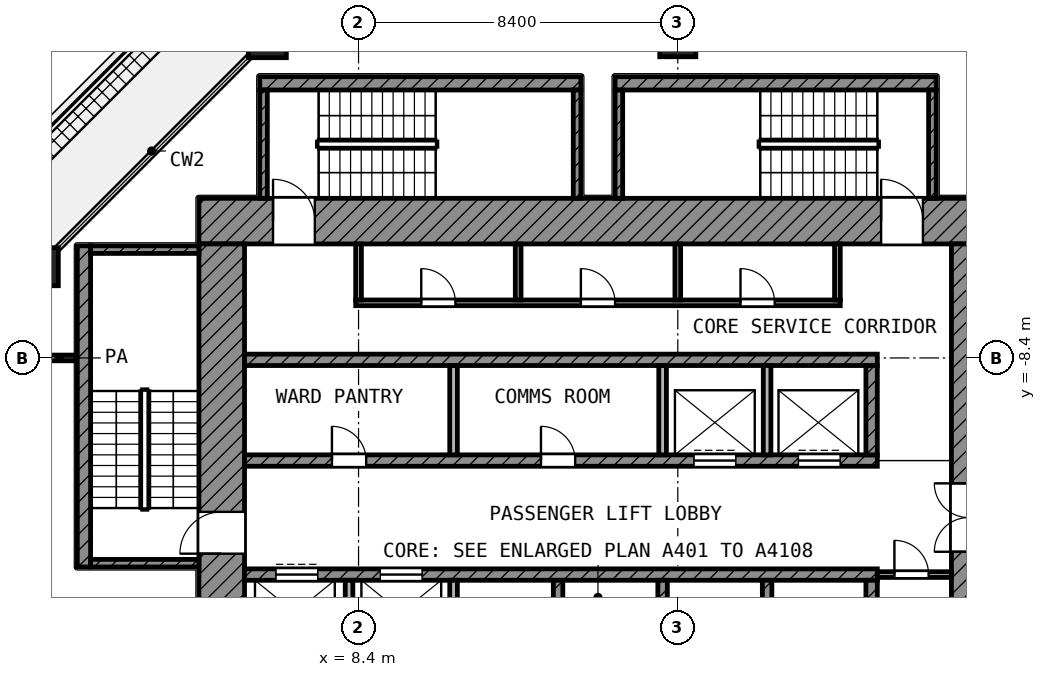
"""IFC4 building model, lengths in metres.
Left out: names, types, materials, properties, quantities, classifications, styles, units other than length and angle.
Written with IfcOpenShell. Run it as: python <this file> out.ifc"""

import sys

from ifc_helpers import new_model, si_unit, direction, frame, frame_2d, origin, origin_2d, place, context, subcontext, project, spatial, rectangle, extrude, element, fill, save


model = new_model("IFC4")
c1 = context("Model", 3, precision=1e-05, world=origin(), true_north=direction((0.0, 1.0)))
c2 = subcontext(c1, "Body", "Model", "MODEL_VIEW")
j1 = project(units=[si_unit("LENGTHUNIT", "METRE"), si_unit("PLANEANGLEUNIT", "RADIAN")], contexts=[c1])
p1 = place(None, origin())
s1 = spatial("IfcSite", under=j1, at=p1, CompositionType="ELEMENT")
p2 = place(p1, origin())
s2 = spatial("IfcBuilding", under=s1, at=p2, CompositionType="ELEMENT")
p3 = place(p2, frame((0.0, 0.0, 166.8)))
s3 = spatial("IfcBuildingStorey", under=s2, at=p3, CompositionType="ELEMENT", Elevation=166.8)
p4 = place(p3, frame((6.0, 0.0, 0.0), z_axis=(0.0, 0.0, 1.0), x_axis=(1.0, 0.0, 0.0)))
e1 = element("IfcColumn", 1, at=p4, inside=s3, PredefinedType="COLUMN", context=c2, shape_type="SweptSolid", body=[
    extrude(rectangle(XDim=1.0, YDim=1.0, at=origin_2d()), origin(), (0.0, 0.0, 1.0), 4.2),
])
p5 = place(p3, frame((16.8, 0.0, 0.0), z_axis=(0.0, 0.0, 1.0), x_axis=(1.0, 0.0, 0.0)))
e2 = element("IfcColumn", 2, at=p5, inside=s3, PredefinedType="COLUMN", context=c2, shape_type="SweptSolid", body=[
    extrude(rectangle(XDim=0.95, YDim=0.95, at=origin_2d()), origin(), (0.0, 0.0, 1.0), 4.2),
])
p6 = place(p3, frame((0.0, -6.0, 0.0), z_axis=(0.0, 0.0, 1.0), x_axis=(1.0, 0.0, 0.0)))
e3 = element("IfcColumn", 3, at=p6, inside=s3, PredefinedType="COLUMN", context=c2, shape_type="SweptSolid", body=[
    extrude(rectangle(XDim=1.0, YDim=1.0, at=origin_2d()), origin(), (0.0, 0.0, 1.0), 4.2),
])
p7 = place(p3, frame((4.2, -4.8, 0.0), z_axis=(0.0, 0.0, 1.0), x_axis=(1.0, 0.0, 0.0)))
e4 = element("IfcWall", 4, at=p7, inside=s3, PredefinedType="SHEAR", context=c2, shape_type="SweptSolid", body=[
    extrude(rectangle(XDim=20.7, YDim=1.2, at=frame_2d((10.35, 0.0))), origin(), (0.0, 0.0, 1.0), 3.6),
])
p8 = place(p7, frame((1.95, 0.0, 0.0)))
e5 = element("IfcOpeningElement", 5, at=p8, cuts=e4, PredefinedType="OPENING", context=c2, shape_type="SweptSolid", body=[
    extrude(rectangle(XDim=1.1, YDim=2.1, at=frame_2d((0.55, 1.05))), frame((0.0, 0.61, 0.0), z_axis=(0.0, -1.0, 0.0), x_axis=(1.0, 0.0, 0.0)), (0.0, 0.0, 1.0), 1.22),
])
p9 = place(p7, frame((17.95, 0.0, 0.0)))
e6 = element("IfcOpeningElement", 6, at=p9, cuts=e4, PredefinedType="OPENING", context=c2, shape_type="SweptSolid", body=[
    extrude(rectangle(XDim=1.1, YDim=2.1, at=frame_2d((0.55, 1.05))), frame((0.0, 0.61, 0.0), z_axis=(0.0, -1.0, 0.0), x_axis=(1.0, 0.0, 0.0)), (0.0, 0.0, 1.0), 1.22),
])
p10 = place(p3, frame((4.8, -24.9, 0.0), z_axis=(0.0, 0.0, 1.0), x_axis=(0.0, 1.0, 0.0)))
e7 = element("IfcWall", 7, at=p10, inside=s3, PredefinedType="SHEAR", context=c2, shape_type="SweptSolid", body=[
    extrude(rectangle(XDim=19.5, YDim=1.2, at=frame_2d((9.75, 0.0))), origin(), (0.0, 0.0, 1.0), 3.6),
])
p11 = place(p10, frame((11.35, 0.0, 0.0)))
e8 = element("IfcOpeningElement", 8, at=p11, cuts=e7, PredefinedType="OPENING", context=c2, shape_type="SweptSolid", body=[
    extrude(rectangle(XDim=1.1, YDim=2.1, at=frame_2d((0.55, 1.05))), frame((0.0, 0.61, 0.0), z_axis=(0.0, -1.0, 0.0), x_axis=(1.0, 0.0, 0.0)), (0.0, 0.0, 1.0), 1.22),
])
p12 = place(p10, frame((2.05, 0.0, 0.0)))
e9 = element("IfcOpeningElement", 9, at=p12, cuts=e7, PredefinedType="OPENING", context=c2, shape_type="SweptSolid", body=[
    extrude(rectangle(XDim=1.1, YDim=2.1, at=frame_2d((0.55, 1.05))), frame((0.0, 0.61, 0.0), z_axis=(0.0, -1.0, 0.0), x_axis=(1.0, 0.0, 0.0)), (0.0, 0.0, 1.0), 1.22),
])
p13 = place(p3, frame((24.45, -24.0, 0.0), z_axis=(0.0, 0.0, 1.0), x_axis=(0.0, 1.0, 0.0)))
e10 = element("IfcWall", 10, at=p13, inside=s3, PredefinedType="SHEAR", context=c2, shape_type="SweptSolid", body=[
    extrude(rectangle(XDim=18.6, YDim=0.9, at=frame_2d((9.3, 0.0))), origin(), (0.0, 0.0, 1.0), 3.6),
])
p14 = place(p13, frame((10.5, 0.0, 0.0)))
e11 = element("IfcOpeningElement", 11, at=p14, cuts=e10, PredefinedType="OPENING", context=c2, shape_type="SweptSolid", body=[
    extrude(rectangle(XDim=1.8, YDim=2.1, at=frame_2d((0.9, 1.05))), frame((0.0, 0.46, 0.0), z_axis=(0.0, -1.0, 0.0), x_axis=(1.0, 0.0, 0.0)), (0.0, 0.0, 1.0), 0.92),
])
p15 = place(p3, frame((5.4, -8.45, 0.0), z_axis=(0.0, 0.0, 1.0), x_axis=(1.0, 0.0, 0.0)))
e12 = element("IfcWall", 12, at=p15, inside=s3, PredefinedType="SHEAR", context=c2, shape_type="SweptSolid", body=[
    extrude(rectangle(XDim=16.65, YDim=0.3, at=frame_2d((8.325, 0.0))), origin(), (0.0, 0.0, 1.0), 3.6),
])
p16 = place(p3, frame((5.4, -11.1, 0.0), z_axis=(0.0, 0.0, 1.0), x_axis=(1.0, 0.0, 0.0)))
e13 = element("IfcWall", 13, at=p16, inside=s3, PredefinedType="SHEAR", context=c2, shape_type="SweptSolid", body=[
    extrude(rectangle(XDim=16.65, YDim=0.3, at=frame_2d((8.325, 0.0))), origin(), (0.0, 0.0, 1.0), 3.6),
])
p17 = place(p16, frame((11.825, 0.0, 0.0)))
e14 = element("IfcOpeningElement", 14, at=p17, cuts=e13, PredefinedType="OPENING", context=c2, shape_type="SweptSolid", body=[
    extrude(rectangle(XDim=1.1, YDim=2.1, at=frame_2d((0.55, 1.05))), frame((0.0, 0.16, 0.0), z_axis=(0.0, -1.0, 0.0), x_axis=(1.0, 0.0, 0.0)), (0.0, 0.0, 1.0), 0.32),
])
p18 = place(p16, frame((14.575, 0.0, 0.0)))
e15 = element("IfcOpeningElement", 15, at=p18, cuts=e13, PredefinedType="OPENING", context=c2, shape_type="SweptSolid", body=[
    extrude(rectangle(XDim=1.1, YDim=2.1, at=frame_2d((0.55, 1.05))), frame((0.0, 0.16, 0.0), z_axis=(0.0, -1.0, 0.0), x_axis=(1.0, 0.0, 0.0)), (0.0, 0.0, 1.0), 0.32),
])
p19 = place(p16, frame((2.3, 0.0, 0.0)))
e16 = element("IfcOpeningElement", 16, at=p19, cuts=e13, PredefinedType="OPENING", context=c2, shape_type="SweptSolid", body=[
    extrude(rectangle(XDim=0.9, YDim=2.1, at=frame_2d((0.45, 1.05))), frame((0.0, 0.16, 0.0), z_axis=(0.0, -1.0, 0.0), x_axis=(1.0, 0.0, 0.0)), (0.0, 0.0, 1.0), 0.32),
])
p20 = place(p16, frame((7.8, 0.0, 0.0)))
e17 = element("IfcOpeningElement", 17, at=p20, cuts=e13, PredefinedType="OPENING", context=c2, shape_type="SweptSolid", body=[
    extrude(rectangle(XDim=0.9, YDim=2.1, at=frame_2d((0.45, 1.05))), frame((0.0, 0.16, 0.0), z_axis=(0.0, -1.0, 0.0), x_axis=(1.0, 0.0, 0.0)), (0.0, 0.0, 1.0), 0.32),
])
p21 = place(p3, frame((5.4, -14.1, 0.0), z_axis=(0.0, 0.0, 1.0), x_axis=(1.0, 0.0, 0.0)))
e18 = element("IfcWall", 18, at=p21, inside=s3, PredefinedType="SHEAR", context=c2, shape_type="SweptSolid", body=[
    extrude(rectangle(XDim=16.65, YDim=0.3, at=frame_2d((8.325, 0.0))), origin(), (0.0, 0.0, 1.0), 3.6),
])
p22 = place(p21, frame((0.825, 0.0, 0.0)))
e19 = element("IfcOpeningElement", 19, at=p22, cuts=e18, PredefinedType="OPENING", context=c2, shape_type="SweptSolid", body=[
    extrude(rectangle(XDim=1.1, YDim=2.1, at=frame_2d((0.55, 1.05))), frame((0.0, 0.16, 0.0), z_axis=(0.0, -1.0, 0.0), x_axis=(1.0, 0.0, 0.0)), (0.0, 0.0, 1.0), 0.32),
])
p23 = place(p21, frame((3.575, 0.0, 0.0)))
e20 = element("IfcOpeningElement", 20, at=p23, cuts=e18, PredefinedType="OPENING", context=c2, shape_type="SweptSolid", body=[
    extrude(rectangle(XDim=1.1, YDim=2.1, at=frame_2d((0.55, 1.05))), frame((0.0, 0.16, 0.0), z_axis=(0.0, -1.0, 0.0), x_axis=(1.0, 0.0, 0.0)), (0.0, 0.0, 1.0), 0.32),
])
p24 = place(p3, frame((21.9, -10.95, 0.0), z_axis=(0.0, 0.0, 1.0), x_axis=(0.0, 1.0, 0.0)))
e21 = element("IfcWall", 21, at=p24, inside=s3, PredefinedType="SHEAR", context=c2, shape_type="SweptSolid", body=[
    extrude(rectangle(XDim=2.35, YDim=0.3, at=frame_2d((1.175, 0.0))), origin(), (0.0, 0.0, 1.0), 3.6),
])
p25 = place(p3, frame((21.9, -16.6, 0.0), z_axis=(0.0, 0.0, 1.0), x_axis=(0.0, 1.0, 0.0)))
e22 = element("IfcWall", 22, at=p25, inside=s3, PredefinedType="SHEAR", context=c2, shape_type="SweptSolid", body=[
    extrude(rectangle(XDim=2.35, YDim=0.3, at=frame_2d((1.175, 0.0))), origin(), (0.0, 0.0, 1.0), 3.6),
])
for number, where, z_axis, x_axis in (
    (23, (10.9, -10.95, 0.0), (0.0, 0.0, 1.0), (0.0, 1.0, 0.0)),
    (24, (16.4, -10.95, 0.0), (0.0, 0.0, 1.0), (0.0, 1.0, 0.0)),
    (25, (19.15, -10.95, 0.0), (0.0, 0.0, 1.0), (0.0, 1.0, 0.0)),
):
    element("IfcWall", number, at=place(p3, frame(where, z_axis=z_axis, x_axis=x_axis)), inside=s3, PredefinedType="PARTITIONING", context=c2, shape_type="SweptSolid", body=[
        extrude(rectangle(XDim=2.35, YDim=0.2, at=frame_2d((1.175, 0.0))), origin(), (0.0, 0.0, 1.0), 3.6),
    ])
for number, where, z_axis, x_axis in (
    (26, (8.15, -16.6, 0.0), (0.0, 0.0, 1.0), (0.0, 1.0, 0.0)),
    (27, (10.9, -16.6, 0.0), (0.0, 0.0, 1.0), (0.0, 1.0, 0.0)),
):
    element("IfcWall", number, at=place(p3, frame(where, z_axis=z_axis, x_axis=x_axis)), inside=s3, PredefinedType="PARTITIONING", context=c2, shape_type="SweptSolid", body=[
        extrude(rectangle(XDim=2.35, YDim=0.2, at=frame_2d((1.175, 0.0))), origin(), (0.0, 0.0, 1.0), 3.6),
    ])
for number, where, z_axis, x_axis in (
    (28, (13.65, -16.6, 0.0), (0.0, 0.0, 1.0), (0.0, 1.0, 0.0)),
    (29, (16.4, -16.6, 0.0), (0.0, 0.0, 1.0), (0.0, 1.0, 0.0)),
    (30, (19.15, -16.6, 0.0), (0.0, 0.0, 1.0), (0.0, 1.0, 0.0)),
):
    element("IfcWall", number, at=place(p3, frame(where, z_axis=z_axis, x_axis=x_axis)), inside=s3, PredefinedType="SHEAR", context=c2, shape_type="SweptSolid", body=[
        extrude(rectangle(XDim=2.35, YDim=0.25, at=frame_2d((1.175, 0.0))), origin(), (0.0, 0.0, 1.0), 3.6),
    ])
p26 = place(p3, frame((22.05, -14.1, 0.0), z_axis=(0.0, 0.0, 1.0), x_axis=(1.0, 0.0, 0.0)))
e31 = element("IfcWall", 31, at=p26, inside=s3, PredefinedType="PARTITIONING", context=c2, shape_type="SweptSolid", body=[
    extrude(rectangle(XDim=1.95, YDim=0.15, at=frame_2d((0.975, 0.0))), origin(), (0.0, 0.0, 1.0), 3.6),
])
p27 = place(p26, frame((0.45, 0.0, 0.0)))
e32 = element("IfcOpeningElement", 32, at=p27, cuts=e31, PredefinedType="OPENING", context=c2, shape_type="SweptSolid", body=[
    extrude(rectangle(XDim=0.9, YDim=2.1, at=frame_2d((0.45, 1.05))), frame((0.0, 0.085, 0.0), z_axis=(0.0, -1.0, 0.0), x_axis=(1.0, 0.0, 0.0)), (0.0, 0.0, 1.0), 0.17),
])
p28 = place(p3, frame((8.325, -6.95, 0.0), z_axis=(0.0, 0.0, 1.0), x_axis=(1.0, 0.0, 0.0)))
e33 = element("IfcWall", 33, at=p28, inside=s3, PredefinedType="PARTITIONING", context=c2, shape_type="SweptSolid", body=[
    extrude(rectangle(XDim=12.75, YDim=0.15, at=frame_2d((6.375, 0.0))), origin(), (0.0, 0.0, 1.0), 3.6),
])
p29 = place(p28, frame((1.725, 0.0, 0.0)))
e34 = element("IfcOpeningElement", 34, at=p29, cuts=e33, PredefinedType="OPENING", context=c2, shape_type="SweptSolid", body=[
    extrude(rectangle(XDim=0.9, YDim=2.1, at=frame_2d((0.45, 1.05))), frame((0.0, 0.085, 0.0), z_axis=(0.0, -1.0, 0.0), x_axis=(1.0, 0.0, 0.0)), (0.0, 0.0, 1.0), 0.17),
])
p30 = place(p28, frame((5.925, 0.0, 0.0)))
e35 = element("IfcOpeningElement", 35, at=p30, cuts=e33, PredefinedType="OPENING", context=c2, shape_type="SweptSolid", body=[
    extrude(rectangle(XDim=0.9, YDim=2.1, at=frame_2d((0.45, 1.05))), frame((0.0, 0.085, 0.0), z_axis=(0.0, -1.0, 0.0), x_axis=(1.0, 0.0, 0.0)), (0.0, 0.0, 1.0), 0.17),
])
p31 = place(p28, frame((10.125, 0.0, 0.0)))
e36 = element("IfcOpeningElement", 36, at=p31, cuts=e33, PredefinedType="OPENING", context=c2, shape_type="SweptSolid", body=[
    extrude(rectangle(XDim=0.9, YDim=2.1, at=frame_2d((0.45, 1.05))), frame((0.0, 0.085, 0.0), z_axis=(0.0, -1.0, 0.0), x_axis=(1.0, 0.0, 0.0)), (0.0, 0.0, 1.0), 0.17),
])
for number, where, z_axis, x_axis in (
    (37, (8.4, -6.875, 0.0), (0.0, 0.0, 1.0), (0.0, 1.0, 0.0)),
    (38, (12.6, -6.875, 0.0), (0.0, 0.0, 1.0), (0.0, 1.0, 0.0)),
    (39, (16.8, -6.875, 0.0), (0.0, 0.0, 1.0), (0.0, 1.0, 0.0)),
    (40, (21.0, -6.875, 0.0), (0.0, 0.0, 1.0), (0.0, 1.0, 0.0)),
):
    element("IfcWall", number, at=place(p3, frame(where, z_axis=z_axis, x_axis=x_axis)), inside=s3, PredefinedType="PARTITIONING", context=c2, shape_type="SweptSolid", body=[
        extrude(rectangle(XDim=1.475, YDim=0.15, at=frame_2d((0.738, 0.0))), origin(), (0.0, 0.0, 1.0), 3.6),
    ])
p32 = place(p3, frame((1.175, -13.9, 0.0), z_axis=(0.0, 0.0, 1.0), x_axis=(0.0, 1.0, 0.0)))
e41 = element("IfcWall", 41, at=p32, inside=s3, PredefinedType="SHEAR", context=c2, shape_type="SweptSolid", body=[
    extrude(rectangle(XDim=8.45, YDim=0.35, at=frame_2d((4.225, 0.0))), origin(), (0.0, 0.0, 1.0), 3.6),
])
for number, where, z_axis, x_axis in (
    (42, (1.35, -5.55, 0.0), (0.0, 0.0, 1.0), (1.0, 0.0, 0.0)),
    (43, (1.35, -13.8, 0.0), (0.0, 0.0, 1.0), (1.0, 0.0, 0.0)),
):
    element("IfcWall", number, at=place(p3, frame(where, z_axis=z_axis, x_axis=x_axis)), inside=s3, PredefinedType="SHEAR", context=c2, shape_type="SweptSolid", body=[
        extrude(rectangle(XDim=2.85, YDim=0.2, at=frame_2d((1.425, 0.0))), origin(), (0.0, 0.0, 1.0), 3.6),
    ])
p33 = place(p3, frame((5.8, -1.175, 0.0), z_axis=(0.0, 0.0, 1.0), x_axis=(1.0, 0.0, 0.0)))
e44 = element("IfcWall", 44, at=p33, inside=s3, PredefinedType="SHEAR", context=c2, shape_type="SweptSolid", body=[
    extrude(rectangle(XDim=8.45, YDim=0.35, at=frame_2d((4.225, 0.0))), origin(), (0.0, 0.0, 1.0), 3.6),
])
for number, where, z_axis, x_axis in (
    (45, (5.9, -4.2, 0.0), (0.0, 0.0, 1.0), (0.0, 1.0, 0.0)),
    (46, (14.15, -4.2, 0.0), (0.0, 0.0, 1.0), (0.0, 1.0, 0.0)),
):
    element("IfcWall", number, at=place(p3, frame(where, z_axis=z_axis, x_axis=x_axis)), inside=s3, PredefinedType="SHEAR", context=c2, shape_type="SweptSolid", body=[
        extrude(rectangle(XDim=2.85, YDim=0.2, at=frame_2d((1.425, 0.0))), origin(), (0.0, 0.0, 1.0), 3.6),
    ])
p34 = place(p3, frame((15.15, -1.175, 0.0), z_axis=(0.0, 0.0, 1.0), x_axis=(1.0, 0.0, 0.0)))
e47 = element("IfcWall", 47, at=p34, inside=s3, PredefinedType="SHEAR", context=c2, shape_type="SweptSolid", body=[
    extrude(rectangle(XDim=8.45, YDim=0.35, at=frame_2d((4.225, 0.0))), origin(), (0.0, 0.0, 1.0), 3.6),
])
for number, where, z_axis, x_axis in (
    (48, (15.25, -4.2, 0.0), (0.0, 0.0, 1.0), (0.0, 1.0, 0.0)),
    (49, (23.5, -4.2, 0.0), (0.0, 0.0, 1.0), (0.0, 1.0, 0.0)),
):
    element("IfcWall", number, at=place(p3, frame(where, z_axis=z_axis, x_axis=x_axis)), inside=s3, PredefinedType="SHEAR", context=c2, shape_type="SweptSolid", body=[
        extrude(rectangle(XDim=2.85, YDim=0.2, at=frame_2d((1.425, 0.0))), origin(), (0.0, 0.0, 1.0), 3.6),
    ])
p35 = place(p3, frame((0.08, -8.4, 0.0), z_axis=(0.0, 0.0, 1.0), x_axis=(1.0, 0.0, 0.0)))
e50 = element("IfcWall", 50, at=p35, inside=s3, PredefinedType="PARTITIONING", context=c2, shape_type="SweptSolid", body=[
    extrude(rectangle(XDim=0.89, YDim=0.15, at=frame_2d((0.445, 0.0))), origin(), (0.0, 0.0, 1.0), 3.6),
])
p36 = place(p17, origin())
e51 = element("IfcDoor", 51, at=p36, inside=s3, OperationType="DOUBLE_DOOR_SLIDING", PredefinedType="DOOR", context=c2, shape_type="SweptSolid", body=[
    extrude(rectangle(XDim=1.1, YDim=2.1, at=frame_2d((0.55, 1.05))), frame((0.0, 0.025, 0.0), z_axis=(0.0, -1.0, 0.0), x_axis=(1.0, 0.0, 0.0)), (0.0, 0.0, 1.0), 0.05),
])
fill(e14, e51)
p37 = place(p18, origin())
e52 = element("IfcDoor", 52, at=p37, inside=s3, OperationType="DOUBLE_DOOR_SLIDING", PredefinedType="DOOR", context=c2, shape_type="SweptSolid", body=[
    extrude(rectangle(XDim=1.1, YDim=2.1, at=frame_2d((0.55, 1.05))), frame((0.0, 0.025, 0.0), z_axis=(0.0, -1.0, 0.0), x_axis=(1.0, 0.0, 0.0)), (0.0, 0.0, 1.0), 0.05),
])
fill(e15, e52)
p38 = place(p22, origin())
e53 = element("IfcDoor", 53, at=p38, inside=s3, OperationType="DOUBLE_DOOR_SLIDING", PredefinedType="DOOR", context=c2, shape_type="SweptSolid", body=[
    extrude(rectangle(XDim=1.1, YDim=2.1, at=frame_2d((0.55, 1.05))), frame((0.0, 0.025, 0.0), z_axis=(0.0, -1.0, 0.0), x_axis=(1.0, 0.0, 0.0)), (0.0, 0.0, 1.0), 0.05),
])
fill(e19, e53)
p39 = place(p23, origin())
e54 = element("IfcDoor", 54, at=p39, inside=s3, OperationType="DOUBLE_DOOR_SLIDING", PredefinedType="DOOR", context=c2, shape_type="SweptSolid", body=[
    extrude(rectangle(XDim=1.1, YDim=2.1, at=frame_2d((0.55, 1.05))), frame((0.0, 0.025, 0.0), z_axis=(0.0, -1.0, 0.0), x_axis=(1.0, 0.0, 0.0)), (0.0, 0.0, 1.0), 0.05),
])
fill(e20, e54)
p40 = place(p11, origin())
e55 = element("IfcDoor", 55, at=p40, inside=s3, OperationType="SINGLE_SWING_LEFT", PredefinedType="DOOR", context=c2, shape_type="SweptSolid", body=[
    extrude(rectangle(XDim=1.1, YDim=2.1, at=frame_2d((0.55, 1.05))), frame((0.0, 0.025, 0.0), z_axis=(0.0, -1.0, 0.0), x_axis=(1.0, 0.0, 0.0)), (0.0, 0.0, 1.0), 0.05),
])
fill(e8, e55)
p41 = place(p8, origin())
e56 = element("IfcDoor", 56, at=p41, inside=s3, OperationType="SINGLE_SWING_LEFT", PredefinedType="DOOR", context=c2, shape_type="SweptSolid", body=[
    extrude(rectangle(XDim=1.1, YDim=2.1, at=frame_2d((0.55, 1.05))), frame((0.0, 0.025, 0.0), z_axis=(0.0, -1.0, 0.0), x_axis=(1.0, 0.0, 0.0)), (0.0, 0.0, 1.0), 0.05),
])
fill(e5, e56)
p42 = place(p9, origin())
e57 = element("IfcDoor", 57, at=p42, inside=s3, OperationType="SINGLE_SWING_LEFT", PredefinedType="DOOR", context=c2, shape_type="SweptSolid", body=[
    extrude(rectangle(XDim=1.1, YDim=2.1, at=frame_2d((0.55, 1.05))), frame((0.0, 0.025, 0.0), z_axis=(0.0, -1.0, 0.0), x_axis=(1.0, 0.0, 0.0)), (0.0, 0.0, 1.0), 0.05),
])
fill(e6, e57)
p43 = place(p29, origin())
e58 = element("IfcDoor", 58, at=p43, inside=s3, OperationType="SINGLE_SWING_LEFT", PredefinedType="DOOR", context=c2, shape_type="SweptSolid", body=[
    extrude(rectangle(XDim=0.9, YDim=2.1, at=frame_2d((0.45, 1.05))), frame((0.0, 0.025, 0.0), z_axis=(0.0, -1.0, 0.0), x_axis=(1.0, 0.0, 0.0)), (0.0, 0.0, 1.0), 0.05),
])
fill(e34, e58)
p44 = place(p30, origin())
e59 = element("IfcDoor", 59, at=p44, inside=s3, OperationType="SINGLE_SWING_LEFT", PredefinedType="DOOR", context=c2, shape_type="SweptSolid", body=[
    extrude(rectangle(XDim=0.9, YDim=2.1, at=frame_2d((0.45, 1.05))), frame((0.0, 0.025, 0.0), z_axis=(0.0, -1.0, 0.0), x_axis=(1.0, 0.0, 0.0)), (0.0, 0.0, 1.0), 0.05),
])
fill(e35, e59)
p45 = place(p31, origin())
e60 = element("IfcDoor", 60, at=p45, inside=s3, OperationType="SINGLE_SWING_LEFT", PredefinedType="DOOR", context=c2, shape_type="SweptSolid", body=[
    extrude(rectangle(XDim=0.9, YDim=2.1, at=frame_2d((0.45, 1.05))), frame((0.0, 0.025, 0.0), z_axis=(0.0, -1.0, 0.0), x_axis=(1.0, 0.0, 0.0)), (0.0, 0.0, 1.0), 0.05),
])
fill(e36, e60)
p46 = place(p27, origin())
e61 = element("IfcDoor", 61, at=p46, inside=s3, OperationType="SINGLE_SWING_LEFT", PredefinedType="DOOR", context=c2, shape_type="SweptSolid", body=[
    extrude(rectangle(XDim=0.9, YDim=2.1, at=frame_2d((0.45, 1.05))), frame((0.0, 0.025, 0.0), z_axis=(0.0, -1.0, 0.0), x_axis=(1.0, 0.0, 0.0)), (0.0, 0.0, 1.0), 0.05),
])
fill(e32, e61)
p47 = place(p19, origin())
e62 = element("IfcDoor", 62, at=p47, inside=s3, OperationType="SINGLE_SWING_LEFT", PredefinedType="DOOR", context=c2, shape_type="SweptSolid", body=[
    extrude(rectangle(XDim=0.9, YDim=2.1, at=frame_2d((0.45, 1.05))), frame((0.0, 0.025, 0.0), z_axis=(0.0, -1.0, 0.0), x_axis=(1.0, 0.0, 0.0)), (0.0, 0.0, 1.0), 0.05),
])
fill(e16, e62)
p48 = place(p20, origin())
e63 = element("IfcDoor", 63, at=p48, inside=s3, OperationType="SINGLE_SWING_LEFT", PredefinedType="DOOR", context=c2, shape_type="SweptSolid", body=[
    extrude(rectangle(XDim=0.9, YDim=2.1, at=frame_2d((0.45, 1.05))), frame((0.0, 0.025, 0.0), z_axis=(0.0, -1.0, 0.0), x_axis=(1.0, 0.0, 0.0)), (0.0, 0.0, 1.0), 0.05),
])
fill(e17, e63)
save(model, sys.argv[1])
